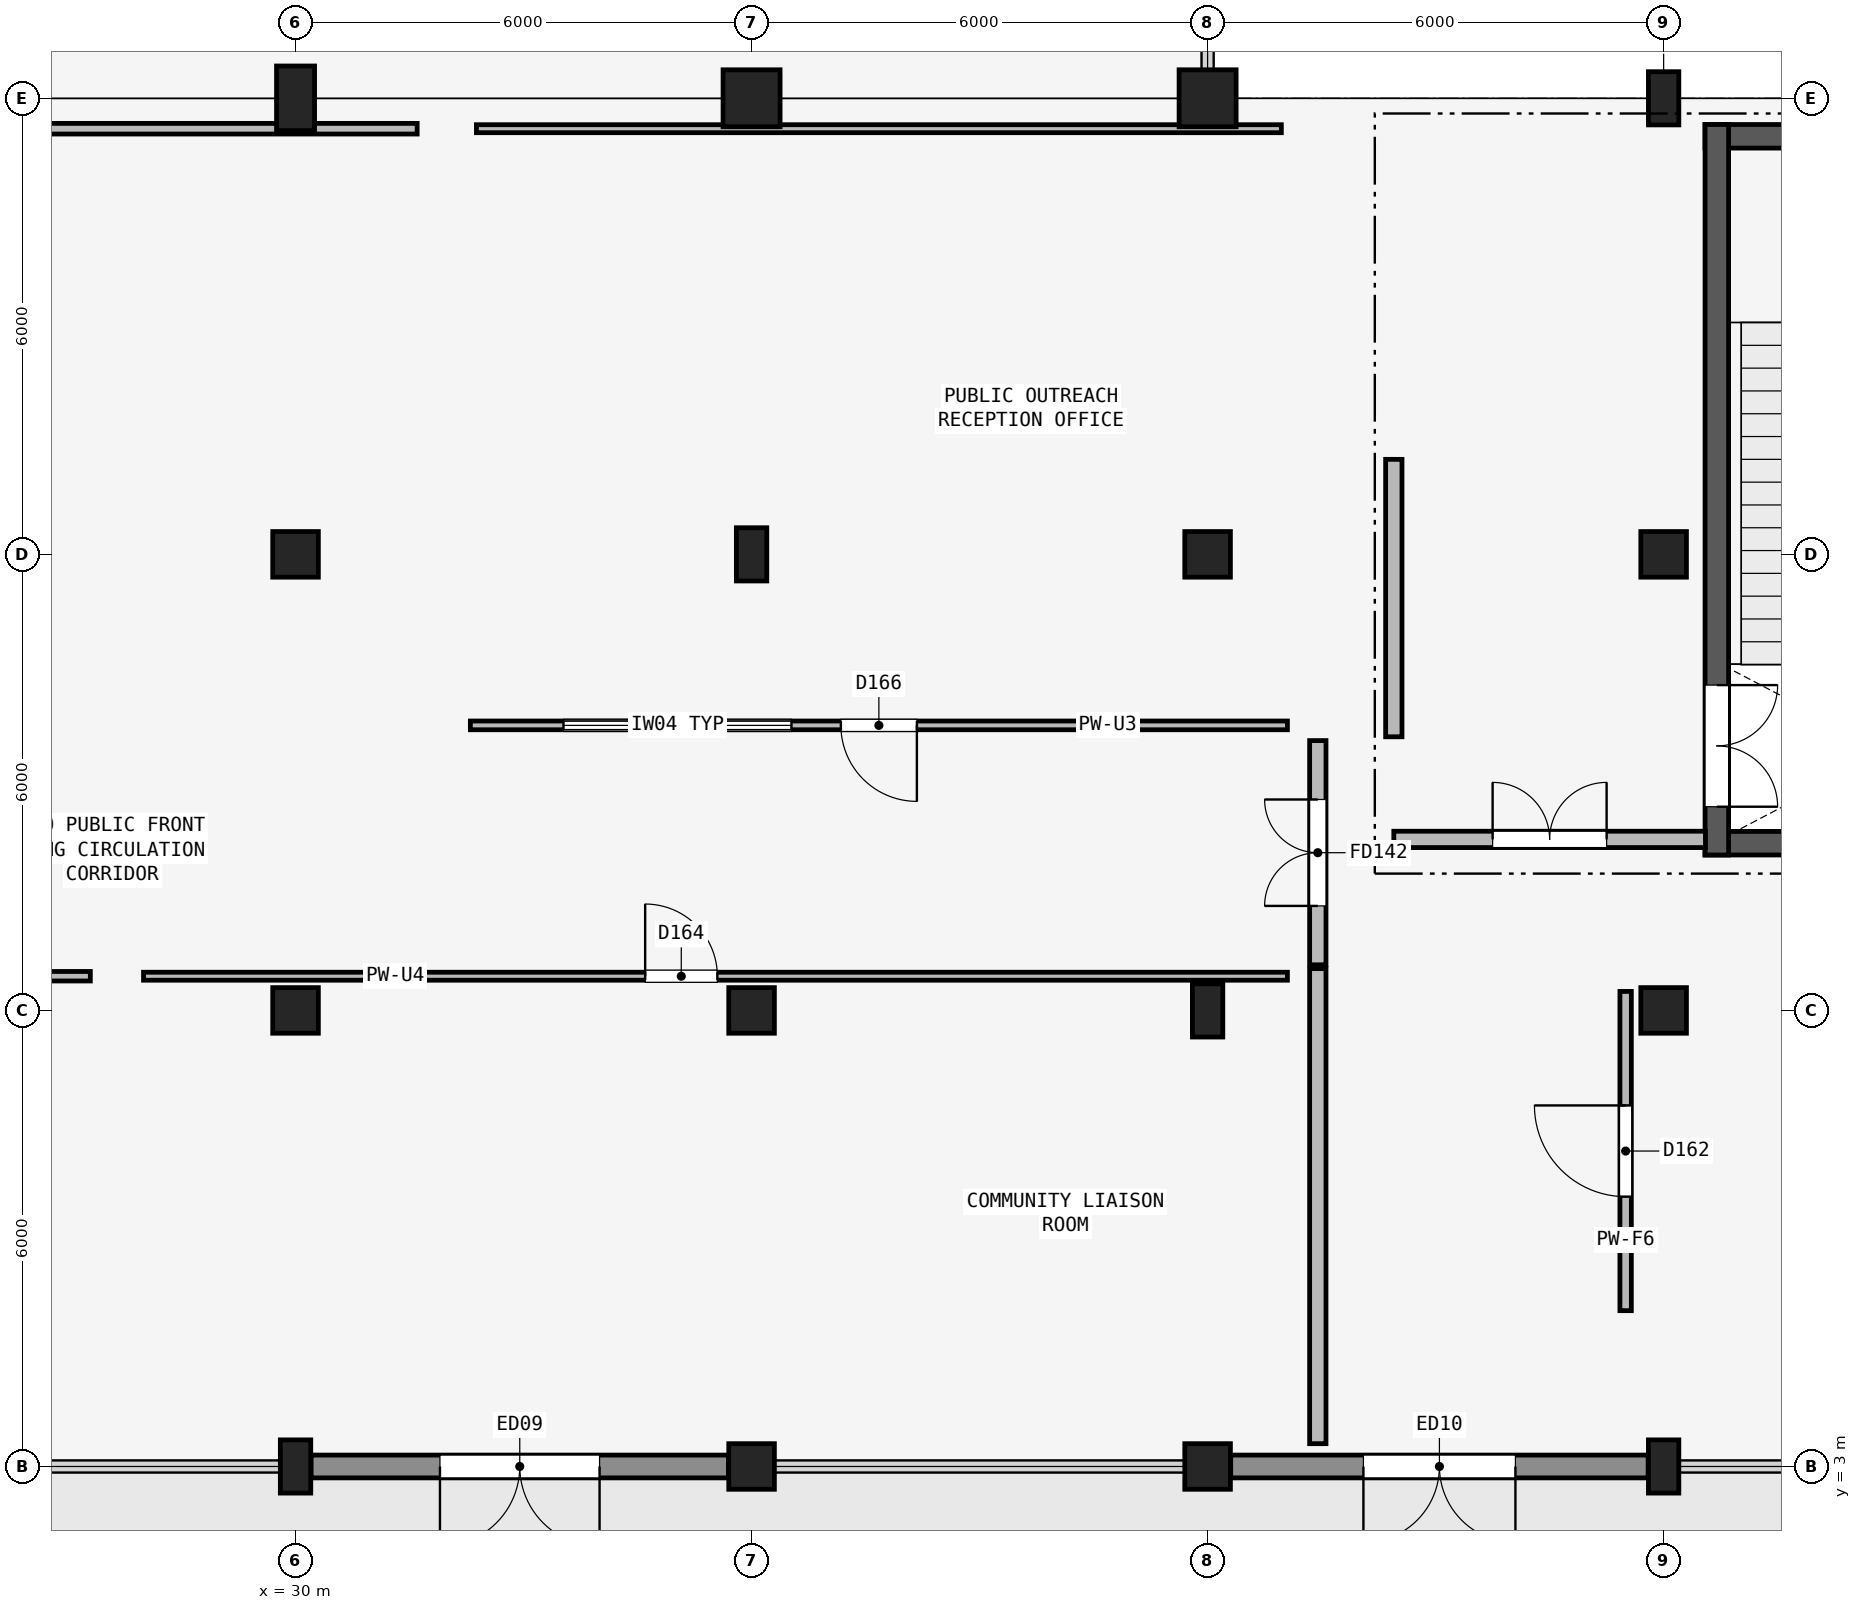
"""IFC4 building model, lengths in metres.
Left out: names, types, materials, properties, quantities, classifications, styles, units other than length and angle.
Written with IfcOpenShell. Run it as: python <this file> out.ifc"""

import sys

from ifc_helpers import new_model, si_unit, direction, frame, frame_2d, origin, origin_2d, place, context, subcontext, project, spatial, rectangle, extrude, element, fill, save


model = new_model("IFC4")
c1 = context("Model", 3, precision=1e-05, world=origin(), true_north=direction((0.0, 1.0)))
c2 = subcontext(c1, "Body", "Model", "MODEL_VIEW")
j1 = project(units=[si_unit("LENGTHUNIT", "METRE"), si_unit("PLANEANGLEUNIT", "RADIAN")], contexts=[c1])
p1 = place(None, origin())
s1 = spatial("IfcSite", under=j1, at=p1, CompositionType="ELEMENT")
p2 = place(p1, origin())
s2 = spatial("IfcBuilding", under=s1, at=p2, CompositionType="ELEMENT")
p3 = place(p2, origin())
s3 = spatial("IfcBuildingStorey", under=s2, at=p3, CompositionType="ELEMENT", Elevation=0.0)
p4 = place(p3, frame((30.0, 3.0, 0.0), z_axis=(0.0, 0.0, 1.0), x_axis=(1.0, 0.0, 0.0)))
e1 = element("IfcColumn", 1, at=p4, inside=s3, PredefinedType="COLUMN", context=c2, shape_type="SweptSolid", body=[
    extrude(rectangle(XDim=0.4, YDim=0.7, at=origin_2d()), origin(), (0.0, 0.0, 1.0), 4.8),
])
for number, where, z_axis, x_axis in (
    (2, (30.0, 9.0, 0.0), (0.0, 0.0, 1.0), (1.0, 0.0, 0.0)),
    (3, (30.0, 15.0, 0.0), (0.0, 0.0, 1.0), (1.0, 0.0, 0.0)),
):
    element("IfcColumn", number, at=place(p3, frame(where, z_axis=z_axis, x_axis=x_axis)), inside=s3, PredefinedType="COLUMN", context=c2, shape_type="SweptSolid", body=[
        extrude(rectangle(XDim=0.6, YDim=0.6, at=origin_2d()), origin(), (0.0, 0.0, 1.0), 4.8),
    ])
p5 = place(p3, frame((30.0, 21.0, 0.0), z_axis=(0.0, 0.0, 1.0), x_axis=(1.0, 0.0, 0.0)))
e4 = element("IfcColumn", 4, at=p5, inside=s3, PredefinedType="COLUMN", context=c2, shape_type="SweptSolid", body=[
    extrude(rectangle(XDim=0.5, YDim=0.85, at=origin_2d()), origin(), (0.0, 0.0, 1.0), 4.8),
])
for number, where, z_axis, x_axis in (
    (5, (36.0, 3.0, 0.0), (0.0, 0.0, 1.0), (1.0, 0.0, 0.0)),
    (6, (36.0, 9.0, 0.0), (0.0, 0.0, 1.0), (1.0, 0.0, 0.0)),
):
    element("IfcColumn", number, at=place(p3, frame(where, z_axis=z_axis, x_axis=x_axis)), inside=s3, PredefinedType="COLUMN", context=c2, shape_type="SweptSolid", body=[
        extrude(rectangle(XDim=0.6, YDim=0.6, at=origin_2d()), origin(), (0.0, 0.0, 1.0), 4.8),
    ])
p6 = place(p3, frame((36.0, 15.0, 0.0), z_axis=(0.0, 0.0, 1.0), x_axis=(1.0, 0.0, 0.0)))
e7 = element("IfcColumn", 7, at=p6, inside=s3, PredefinedType="COLUMN", context=c2, shape_type="SweptSolid", body=[
    extrude(rectangle(XDim=0.4, YDim=0.7, at=origin_2d()), origin(), (0.0, 0.0, 1.0), 4.8),
])
p7 = place(p3, frame((36.0, 21.0, 0.0), z_axis=(0.0, 0.0, 1.0), x_axis=(1.0, 0.0, 0.0)))
e8 = element("IfcColumn", 8, at=p7, inside=s3, PredefinedType="COLUMN", context=c2, shape_type="SweptSolid", body=[
    extrude(rectangle(XDim=0.75, YDim=0.75, at=origin_2d()), origin(), (0.0, 0.0, 1.0), 4.8),
])
p8 = place(p3, frame((42.0, 3.0, 0.0), z_axis=(0.0, 0.0, 1.0), x_axis=(1.0, 0.0, 0.0)))
e9 = element("IfcColumn", 9, at=p8, inside=s3, PredefinedType="COLUMN", context=c2, shape_type="SweptSolid", body=[
    extrude(rectangle(XDim=0.6, YDim=0.6, at=origin_2d()), origin(), (0.0, 0.0, 1.0), 4.8),
])
p9 = place(p3, frame((42.0, 9.0, 0.0), z_axis=(0.0, 0.0, 1.0), x_axis=(1.0, 0.0, 0.0)))
e10 = element("IfcColumn", 10, at=p9, inside=s3, PredefinedType="COLUMN", context=c2, shape_type="SweptSolid", body=[
    extrude(rectangle(XDim=0.4, YDim=0.7, at=origin_2d()), origin(), (0.0, 0.0, 1.0), 4.8),
])
p10 = place(p3, frame((42.0, 15.0, 0.0), z_axis=(0.0, 0.0, 1.0), x_axis=(1.0, 0.0, 0.0)))
e11 = element("IfcColumn", 11, at=p10, inside=s3, PredefinedType="COLUMN", context=c2, shape_type="SweptSolid", body=[
    extrude(rectangle(XDim=0.6, YDim=0.6, at=origin_2d()), origin(), (0.0, 0.0, 1.0), 4.8),
])
p11 = place(p3, frame((42.0, 21.0, 0.0), z_axis=(0.0, 0.0, 1.0), x_axis=(1.0, 0.0, 0.0)))
e12 = element("IfcColumn", 12, at=p11, inside=s3, PredefinedType="COLUMN", context=c2, shape_type="SweptSolid", body=[
    extrude(rectangle(XDim=0.75, YDim=0.75, at=origin_2d()), origin(), (0.0, 0.0, 1.0), 4.8),
])
p12 = place(p3, frame((48.0, 3.0, 0.0), z_axis=(0.0, 0.0, 1.0), x_axis=(1.0, 0.0, 0.0)))
e13 = element("IfcColumn", 13, at=p12, inside=s3, PredefinedType="COLUMN", context=c2, shape_type="SweptSolid", body=[
    extrude(rectangle(XDim=0.4, YDim=0.7, at=origin_2d()), origin(), (0.0, 0.0, 1.0), 4.8),
])
for number, where, z_axis, x_axis in (
    (14, (48.0, 9.0, 0.0), (0.0, 0.0, 1.0), (1.0, 0.0, 0.0)),
    (15, (48.0, 15.0, 0.0), (0.0, 0.0, 1.0), (1.0, 0.0, 0.0)),
):
    element("IfcColumn", number, at=place(p3, frame(where, z_axis=z_axis, x_axis=x_axis)), inside=s3, PredefinedType="COLUMN", context=c2, shape_type="SweptSolid", body=[
        extrude(rectangle(XDim=0.6, YDim=0.6, at=origin_2d()), origin(), (0.0, 0.0, 1.0), 4.8),
    ])
p13 = place(p3, frame((48.0, 21.0, 0.0), z_axis=(0.0, 0.0, 1.0), x_axis=(1.0, 0.0, 0.0)))
e16 = element("IfcColumn", 16, at=p13, inside=s3, PredefinedType="COLUMN", context=c2, shape_type="SweptSolid", body=[
    extrude(rectangle(XDim=0.4, YDim=0.7, at=origin_2d()), origin(), (0.0, 0.0, 1.0), 4.8),
])
p14 = place(p3, frame((30.204, 3.0, 0.0), z_axis=(0.0, 0.0, 1.0), x_axis=(1.0, 0.0, 0.0)))
e17 = element("IfcWall", 17, at=p14, inside=s3, PredefinedType="SOLIDWALL", context=c2, shape_type="SweptSolid", body=[
    extrude(rectangle(XDim=5.492, YDim=0.3, at=frame_2d((2.746, 0.0))), origin(), (0.0, 0.0, 1.0), 4.04),
])
p15 = place(p14, frame((1.696, 0.0, 0.0)))
e18 = element("IfcOpeningElement", 18, at=p15, cuts=e17, PredefinedType="OPENING", context=c2, shape_type="SweptSolid", body=[
    extrude(rectangle(XDim=2.1, YDim=2.4, at=frame_2d((1.05, 1.2))), frame((0.0, 0.16, 0.0), z_axis=(0.0, -1.0, 0.0), x_axis=(1.0, 0.0, 0.0)), (0.0, 0.0, 1.0), 0.32),
])
p16 = place(p3, frame((42.304, 3.0, 0.0), z_axis=(0.0, 0.0, 1.0), x_axis=(1.0, 0.0, 0.0)))
e19 = element("IfcWall", 19, at=p16, inside=s3, PredefinedType="SOLIDWALL", context=c2, shape_type="SweptSolid", body=[
    extrude(rectangle(XDim=5.492, YDim=0.3, at=frame_2d((2.746, 0.0))), origin(), (0.0, 0.0, 1.0), 4.04),
])
p17 = place(p16, frame((1.746, 0.0, 0.0)))
e20 = element("IfcOpeningElement", 20, at=p17, cuts=e19, PredefinedType="OPENING", context=c2, shape_type="SweptSolid", body=[
    extrude(rectangle(XDim=2.0, YDim=2.4, at=frame_2d((1.0, 1.2))), frame((0.0, 0.16, 0.0), z_axis=(0.0, -1.0, 0.0), x_axis=(1.0, 0.0, 0.0)), (0.0, 0.0, 1.0), 0.32),
])
for number, where, z_axis, x_axis in (
    (21, (48.545, 11.2, 0.0), (0.0, 0.0, 1.0), (1.0, 0.0, 0.0)),
    (22, (53.355, 20.5, 0.0), (0.0, 0.0, 1.0), (-1.0, 0.0, 0.0)),
):
    element("IfcWall", number, at=place(p3, frame(where, z_axis=z_axis, x_axis=x_axis)), inside=s3, PredefinedType="SHEAR", context=c2, shape_type="SweptSolid", body=[
        extrude(rectangle(XDim=4.81, YDim=0.31, at=frame_2d((2.405, 0.0))), origin(), (0.0, 0.0, 1.0), 4.66),
    ])
p18 = place(p3, frame((48.7, 20.655, 0.0), z_axis=(0.0, 0.0, 1.0), x_axis=(0.0, -1.0, 0.0)))
e23 = element("IfcWall", 23, at=p18, inside=s3, PredefinedType="SHEAR", context=c2, shape_type="SweptSolid", body=[
    extrude(rectangle(XDim=9.61, YDim=0.31, at=frame_2d((4.805, 0.0))), origin(), (0.0, 0.0, 1.0), 4.66),
])
p19 = place(p18, frame((7.375, 0.0, 0.0)))
e24 = element("IfcOpeningElement", 24, at=p19, cuts=e23, PredefinedType="OPENING", context=c2, shape_type="SweptSolid", body=[
    extrude(rectangle(XDim=1.6, YDim=2.2, at=frame_2d((0.8, 1.1))), frame((0.0, 0.165, 0.0), z_axis=(0.0, -1.0, 0.0), x_axis=(1.0, 0.0, 0.0)), (0.0, 0.0, 1.0), 0.33),
])
p20 = place(p3, frame((44.45, 11.25, 0.0), z_axis=(0.0, 0.0, 1.0), x_axis=(1.0, 0.0, 0.0)))
e25 = element("IfcWall", 25, at=p20, inside=s3, PredefinedType="PARTITIONING", context=c2, shape_type="SweptSolid", body=[
    extrude(rectangle(XDim=4.1, YDim=0.215, at=frame_2d((2.05, 0.0))), origin(), (0.0, 0.0, 1.0), 4.09),
])
p21 = place(p20, frame((1.3, 0.0, 0.0)))
e26 = element("IfcOpeningElement", 26, at=p21, cuts=e25, PredefinedType="OPENING", context=c2, shape_type="SweptSolid", body=[
    extrude(rectangle(XDim=1.5, YDim=2.15, at=frame_2d((0.75, 1.075))), frame((0.0, 0.117, 0.0), z_axis=(0.0, -1.0, 0.0), x_axis=(1.0, 0.0, 0.0)), (0.0, 0.0, 1.0), 0.235),
])
p22 = place(p3, frame((43.45, 3.3, 0.0), z_axis=(0.0, 0.0, 1.0), x_axis=(0.0, 1.0, 0.0)))
e27 = element("IfcWall", 27, at=p22, inside=s3, PredefinedType="PARTITIONING", context=c2, shape_type="SweptSolid", body=[
    extrude(rectangle(XDim=6.25, YDim=0.215, at=frame_2d((3.125, 0.0))), origin(), (0.0, 0.0, 1.0), 3.89),
])
p23 = place(p3, frame((43.45, 9.6, 0.0), z_axis=(0.0, 0.0, 1.0), x_axis=(0.0, 1.0, 0.0)))
e28 = element("IfcWall", 28, at=p23, inside=s3, PredefinedType="PARTITIONING", context=c2, shape_type="SweptSolid", body=[
    extrude(rectangle(XDim=2.95, YDim=0.215, at=frame_2d((1.475, 0.0))), origin(), (0.0, 0.0, 1.0), 4.49),
])
p24 = place(p23, frame((0.775, 0.0, 0.0)))
e29 = element("IfcOpeningElement", 29, at=p24, cuts=e28, PredefinedType="OPENING", context=c2, shape_type="SweptSolid", body=[
    extrude(rectangle(XDim=1.4, YDim=2.2, at=frame_2d((0.7, 1.1))), frame((0.0, 0.117, 0.0), z_axis=(0.0, -1.0, 0.0), x_axis=(1.0, 0.0, 0.0)), (0.0, 0.0, 1.0), 0.235),
])
p25 = place(p3, frame((44.45, 12.6, 0.0), z_axis=(0.0, 0.0, 1.0), x_axis=(0.0, 1.0, 0.0)))
e30 = element("IfcWall", 30, at=p25, inside=s3, PredefinedType="PARTITIONING", context=c2, shape_type="SweptSolid", body=[
    extrude(rectangle(XDim=3.65, YDim=0.215, at=frame_2d((1.825, 0.0))), origin(), (0.0, 0.0, 1.0), 3.89),
])
p26 = place(p3, frame((47.5, 5.05, 0.0), z_axis=(0.0, 0.0, 1.0), x_axis=(0.0, 1.0, 0.0)))
e31 = element("IfcWall", 31, at=p26, inside=s3, PredefinedType="PARTITIONING", context=c2, shape_type="SweptSolid", body=[
    extrude(rectangle(XDim=4.2, YDim=0.15, at=frame_2d((2.1, 0.0))), origin(), (0.0, 0.0, 1.0), 3.89),
])
p27 = place(p26, frame((1.5, 0.0, 0.0)))
e32 = element("IfcOpeningElement", 32, at=p27, cuts=e31, PredefinedType="OPENING", context=c2, shape_type="SweptSolid", body=[
    extrude(rectangle(XDim=1.2, YDim=2.15, at=frame_2d((0.6, 1.075))), frame((0.0, 0.085, 0.0), z_axis=(0.0, -1.0, 0.0), x_axis=(1.0, 0.0, 0.0)), (0.0, 0.0, 1.0), 0.17),
])
p28 = place(p3, frame((12.5, 9.45, 0.0), z_axis=(0.0, 0.0, 1.0), x_axis=(1.0, 0.0, 0.0)))
e33 = element("IfcWall", 33, at=p28, inside=s3, PredefinedType="PARTITIONING", context=c2, shape_type="SweptSolid", body=[
    extrude(rectangle(XDim=14.8, YDim=0.125, at=frame_2d((7.4, 0.0))), origin(), (0.0, 0.0, 1.0), 4.09),
])
p29 = place(p28, frame((6.625, 0.0, 0.0)))
e34 = element("IfcOpeningElement", 34, at=p29, cuts=e33, PredefinedType="OPENING", context=c2, shape_type="SweptSolid", body=[
    extrude(rectangle(XDim=1.55, YDim=2.2, at=frame_2d((0.775, 1.1))), frame((0.0, 0.073, 0.0), z_axis=(0.0, -1.0, 0.0), x_axis=(1.0, 0.0, 0.0)), (0.0, 0.0, 1.0), 0.145),
])
p30 = place(p3, frame((28.0, 9.45, 0.0), z_axis=(0.0, 0.0, 1.0), x_axis=(1.0, 0.0, 0.0)))
e35 = element("IfcWall", 35, at=p30, inside=s3, PredefinedType="PARTITIONING", context=c2, shape_type="SweptSolid", body=[
    extrude(rectangle(XDim=15.05, YDim=0.105, at=frame_2d((7.525, 0.0))), origin(), (0.0, 0.0, 1.0), 4.09),
])
p31 = place(p30, frame((6.6, 0.0, 0.0)))
e36 = element("IfcOpeningElement", 36, at=p31, cuts=e35, PredefinedType="OPENING", context=c2, shape_type="SweptSolid", body=[
    extrude(rectangle(XDim=0.95, YDim=2.15, at=frame_2d((0.475, 1.075))), frame((0.0, 0.062, 0.0), z_axis=(0.0, -1.0, 0.0), x_axis=(1.0, 0.0, 0.0)), (0.0, 0.0, 1.0), 0.125),
])
p32 = place(p3, frame((15.579, 20.6, 0.0), z_axis=(0.0, 0.0, 1.0), x_axis=(1.0, 0.0, 0.0)))
e37 = element("IfcWall", 37, at=p32, inside=s3, PredefinedType="PARTITIONING", context=c2, shape_type="SweptSolid", body=[
    extrude(rectangle(XDim=16.021, YDim=0.14, at=frame_2d((8.011, 0.0))), origin(), (0.0, 0.0, 1.0), 4.083),
])
p33 = place(p32, frame((6.65, 0.0, 0.0)))
e38 = element("IfcOpeningElement", 38, at=p33, cuts=e37, PredefinedType="OPENING", context=c2, shape_type="SweptSolid", body=[
    extrude(rectangle(XDim=0.92, YDim=2.1, at=frame_2d((0.46, 1.05))), frame((0.0, 0.08, 0.0), z_axis=(0.0, -1.0, 0.0), x_axis=(1.0, 0.0, 0.0)), (0.0, 0.0, 1.0), 0.16),
])
p34 = place(p3, frame((43.05, 12.75, 0.0), z_axis=(0.0, 0.0, 1.0), x_axis=(-1.0, 0.0, 0.0)))
e39 = element("IfcWall", 39, at=p34, inside=s3, PredefinedType="PARTITIONING", context=c2, shape_type="SweptSolid", body=[
    extrude(rectangle(XDim=10.75, YDim=0.115, at=frame_2d((5.375, 0.0))), origin(), (0.0, 0.0, 1.0), 4.09),
])
p35 = place(p34, frame((4.875, 0.0, 0.0)))
e40 = element("IfcOpeningElement", 40, at=p35, cuts=e39, PredefinedType="OPENING", context=c2, shape_type="SweptSolid", body=[
    extrude(rectangle(XDim=1.0, YDim=2.15, at=frame_2d((0.5, 1.075))), frame((0.0, 0.067, 0.0), z_axis=(0.0, -1.0, 0.0), x_axis=(1.0, 0.0, 0.0)), (0.0, 0.0, 1.0), 0.135),
])
p36 = place(p34, frame((6.525, 0.0, 0.95)))
e41 = element("IfcOpeningElement", 41, at=p36, cuts=e39, PredefinedType="OPENING", context=c2, shape_type="SweptSolid", body=[
    extrude(rectangle(XDim=3.0, YDim=1.3, at=frame_2d((1.5, 0.65))), frame((0.0, 0.067, 0.0), z_axis=(0.0, -1.0, 0.0), x_axis=(1.0, 0.0, 0.0)), (0.0, 0.0, 1.0), 0.135),
])
p37 = place(p3, frame((32.38, 20.6, 0.0), z_axis=(0.0, 0.0, 1.0), x_axis=(1.0, 0.0, 0.0)))
e42 = element("IfcWall", 42, at=p37, inside=s3, PredefinedType="PARTITIONING", context=c2, shape_type="SweptSolid", body=[
    extrude(rectangle(XDim=10.59, YDim=0.105, at=frame_2d((5.295, 0.0))), origin(), (0.0, 0.0, 1.0), 4.083),
])
p38 = place(p15, frame((2.1, 0.0, 0.0), z_axis=(0.0, 0.0, 1.0), x_axis=(-1.0, 0.0, 0.0)))
e43 = element("IfcDoor", 43, at=p38, inside=s3, OperationType="DOUBLE_DOOR_SINGLE_SWING", PredefinedType="DOOR", context=c2, shape_type="SweptSolid", body=[
    extrude(rectangle(XDim=2.1, YDim=2.4, at=frame_2d((1.05, 1.2))), frame((0.0, 0.025, 0.0), z_axis=(0.0, -1.0, 0.0), x_axis=(1.0, 0.0, 0.0)), (0.0, 0.0, 1.0), 0.05),
])
fill(e18, e43)
p39 = place(p17, frame((2.0, 0.0, 0.0), z_axis=(0.0, 0.0, 1.0), x_axis=(-1.0, 0.0, 0.0)))
e44 = element("IfcDoor", 44, at=p39, inside=s3, OperationType="DOUBLE_DOOR_SINGLE_SWING", PredefinedType="DOOR", context=c2, shape_type="SweptSolid", body=[
    extrude(rectangle(XDim=2.0, YDim=2.4, at=frame_2d((1.0, 1.2))), frame((0.0, 0.025, 0.0), z_axis=(0.0, -1.0, 0.0), x_axis=(1.0, 0.0, 0.0)), (0.0, 0.0, 1.0), 0.05),
])
fill(e20, e44)
p40 = place(p19, origin())
e45 = element("IfcDoor", 45, at=p40, inside=s3, OperationType="DOUBLE_DOOR_SINGLE_SWING", PredefinedType="DOOR", context=c2, shape_type="SweptSolid", body=[
    extrude(rectangle(XDim=1.6, YDim=2.2, at=frame_2d((0.8, 1.1))), frame((0.0, 0.025, 0.0), z_axis=(0.0, -1.0, 0.0), x_axis=(1.0, 0.0, 0.0)), (0.0, 0.0, 1.0), 0.05),
])
fill(e24, e45)
p41 = place(p21, origin())
e46 = element("IfcDoor", 46, at=p41, inside=s3, OperationType="DOUBLE_DOOR_SINGLE_SWING", PredefinedType="DOOR", context=c2, shape_type="SweptSolid", body=[
    extrude(rectangle(XDim=1.5, YDim=2.15, at=frame_2d((0.75, 1.075))), frame((0.0, 0.025, 0.0), z_axis=(0.0, -1.0, 0.0), x_axis=(1.0, 0.0, 0.0)), (0.0, 0.0, 1.0), 0.05),
])
fill(e26, e46)
p42 = place(p24, origin())
e47 = element("IfcDoor", 47, at=p42, inside=s3, OperationType="DOUBLE_DOOR_SINGLE_SWING", PredefinedType="DOOR", context=c2, shape_type="SweptSolid", body=[
    extrude(rectangle(XDim=1.4, YDim=2.2, at=frame_2d((0.7, 1.1))), frame((0.0, 0.025, 0.0), z_axis=(0.0, -1.0, 0.0), x_axis=(1.0, 0.0, 0.0)), (0.0, 0.0, 1.0), 0.05),
])
fill(e29, e47)
p43 = place(p27, origin())
e48 = element("IfcDoor", 48, at=p43, inside=s3, OperationType="SINGLE_SWING_RIGHT", PredefinedType="DOOR", context=c2, shape_type="SweptSolid", body=[
    extrude(rectangle(XDim=1.2, YDim=2.15, at=frame_2d((0.6, 1.075))), frame((0.0, 0.025, 0.0), z_axis=(0.0, -1.0, 0.0), x_axis=(1.0, 0.0, 0.0)), (0.0, 0.0, 1.0), 0.05),
])
fill(e32, e48)
p44 = place(p31, origin())
e49 = element("IfcDoor", 49, at=p44, inside=s3, OperationType="SINGLE_SWING_LEFT", PredefinedType="DOOR", context=c2, shape_type="SweptSolid", body=[
    extrude(rectangle(XDim=0.95, YDim=2.15, at=frame_2d((0.475, 1.075))), frame((0.0, 0.025, 0.0), z_axis=(0.0, -1.0, 0.0), x_axis=(1.0, 0.0, 0.0)), (0.0, 0.0, 1.0), 0.05),
])
fill(e36, e49)
p45 = place(p35, origin())
e50 = element("IfcDoor", 50, at=p45, inside=s3, OperationType="SINGLE_SWING_LEFT", PredefinedType="DOOR", context=c2, shape_type="SweptSolid", body=[
    extrude(rectangle(XDim=1.0, YDim=2.15, at=frame_2d((0.5, 1.075))), frame((0.0, 0.025, 0.0), z_axis=(0.0, -1.0, 0.0), x_axis=(1.0, 0.0, 0.0)), (0.0, 0.0, 1.0), 0.05),
])
fill(e40, e50)
p46 = place(p36, origin())
e51 = element("IfcWindow", 51, at=p46, inside=s3, PartitioningType="SINGLE_PANEL", PredefinedType="WINDOW", context=c2, shape_type="SweptSolid", body=[
    extrude(rectangle(XDim=3.0, YDim=1.3, at=frame_2d((1.5, 0.65))), frame((0.0, 0.03, 0.0), z_axis=(0.0, -1.0, 0.0), x_axis=(1.0, 0.0, 0.0)), (0.0, 0.0, 1.0), 0.06),
])
fill(e41, e51)
save(model, sys.argv[1])
